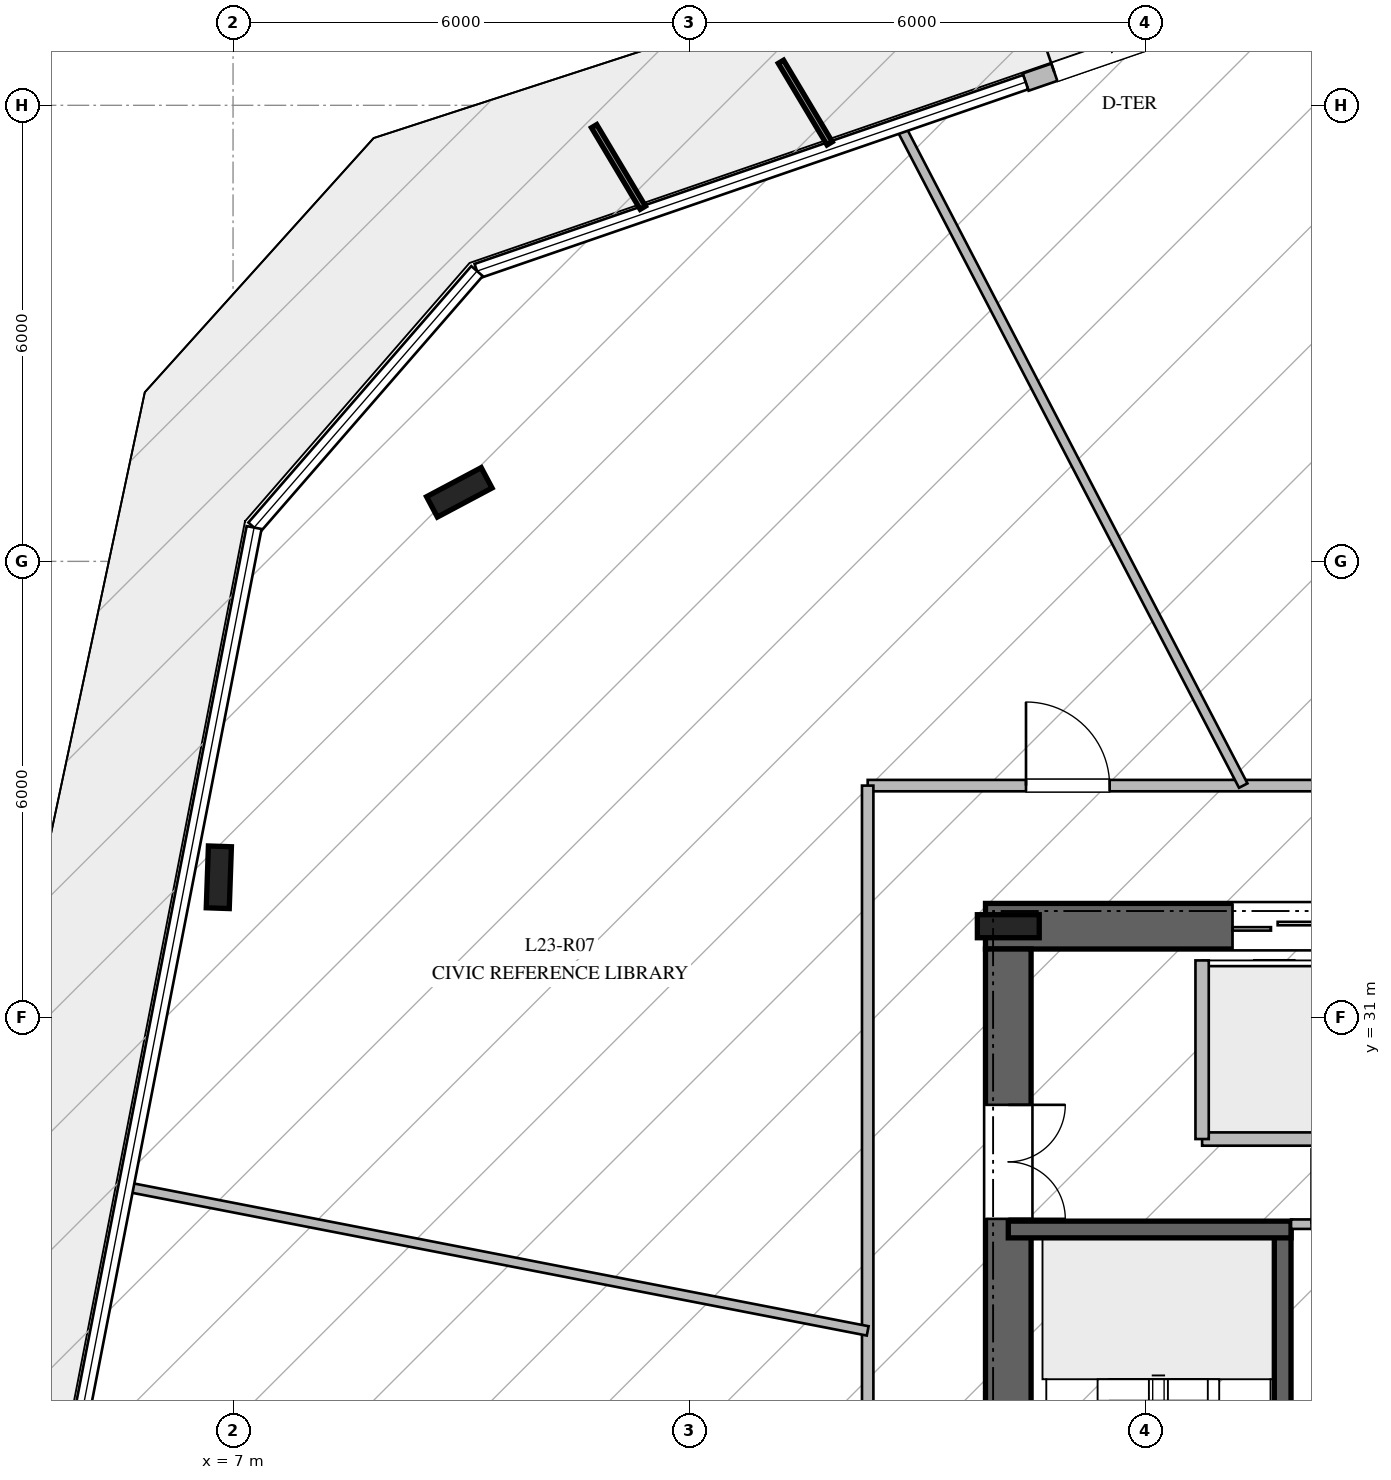
"""IFC4 building model, lengths in metres.
Left out: names, types, materials, properties, quantities, classifications, styles, units other than length and angle.
Written with IfcOpenShell. Run it as: python <this file> out.ifc"""

import sys

from ifc_helpers import new_model, si_unit, direction, frame, frame_2d, origin, origin_2d, place, context, subcontext, project, spatial, rectangle, i_section, extrude, element, fill, save


model = new_model("IFC4")
c1 = context("Model", 3, precision=1e-05, world=origin(), true_north=direction((0.0, 1.0)))
c2 = subcontext(c1, "Body", "Model", "MODEL_VIEW")
j1 = project(units=[si_unit("LENGTHUNIT", "METRE"), si_unit("PLANEANGLEUNIT", "RADIAN")], contexts=[c1])
p1 = place(None, origin())
s1 = spatial("IfcSite", under=j1, at=p1, CompositionType="ELEMENT")
p2 = place(p1, origin())
s2 = spatial("IfcBuilding", under=s1, at=p2, CompositionType="ELEMENT")
p3 = place(p2, frame((0.0, 0.0, 97.4)))
s3 = spatial("IfcBuildingStorey", under=s2, at=p3, CompositionType="ELEMENT", Elevation=97.4)
p4 = place(p3, frame((33.1, 32.2, 0.0), z_axis=(0.0, 0.0, 1.0), x_axis=(-1.0, 0.0, 0.0)))
e1 = element("IfcWall", 1, at=p4, inside=s3, PredefinedType="SHEAR", context=c2, shape_type="SweptSolid", body=[
    extrude(rectangle(XDim=16.2, YDim=0.6, at=frame_2d((8.1, 0.0))), origin(), (0.0, 0.0, 1.0), 4.76),
])
p5 = place(p4, frame((5.05, 0.0, 0.0)))
e2 = element("IfcOpeningElement", 2, at=p5, cuts=e1, PredefinedType="OPENING", context=c2, shape_type="SweptSolid", body=[
    extrude(rectangle(XDim=1.2, YDim=2.25, at=frame_2d((0.6, 1.125))), frame((0.0, 0.31, 0.0), z_axis=(0.0, -1.0, 0.0), x_axis=(1.0, 0.0, 0.0)), (0.0, 0.0, 1.0), 0.62),
])
p6 = place(p4, frame((11.85, 0.0, 0.0)))
e3 = element("IfcOpeningElement", 3, at=p6, cuts=e1, PredefinedType="OPENING", context=c2, shape_type="SweptSolid", body=[
    extrude(rectangle(XDim=1.1, YDim=2.2, at=frame_2d((0.55, 1.1))), frame((0.0, 0.31, 0.0), z_axis=(0.0, -1.0, 0.0), x_axis=(1.0, 0.0, 0.0)), (0.0, 0.0, 1.0), 0.62),
])
p7 = place(p4, frame((9.875, 0.0, 0.0)))
e4 = element("IfcOpeningElement", 4, at=p7, cuts=e1, PredefinedType="OPENING", context=c2, shape_type="SweptSolid", body=[
    extrude(rectangle(XDim=1.1, YDim=2.2, at=frame_2d((0.55, 1.1))), frame((0.0, 0.31, 0.0), z_axis=(0.0, -1.0, 0.0), x_axis=(1.0, 0.0, 0.0)), (0.0, 0.0, 1.0), 0.62),
])
p8 = place(p4, frame((7.9, 0.0, 0.0)))
e5 = element("IfcOpeningElement", 5, at=p8, cuts=e1, PredefinedType="OPENING", context=c2, shape_type="SweptSolid", body=[
    extrude(rectangle(XDim=1.1, YDim=2.2, at=frame_2d((0.55, 1.1))), frame((0.0, 0.31, 0.0), z_axis=(0.0, -1.0, 0.0), x_axis=(1.0, 0.0, 0.0)), (0.0, 0.0, 1.0), 0.62),
])
p9 = place(p3, frame((17.2, 31.9, 0.0), z_axis=(0.0, 0.0, 1.0), x_axis=(0.0, -1.0, 0.0)))
e6 = element("IfcWall", 6, at=p9, inside=s3, PredefinedType="SHEAR", context=c2, shape_type="SweptSolid", body=[
    extrude(rectangle(XDim=13.8, YDim=0.6, at=frame_2d((6.9, 0.0))), origin(), (0.0, 0.0, 1.0), 4.76),
])
p10 = place(p9, frame((2.05, 0.0, 0.0)))
e7 = element("IfcOpeningElement", 7, at=p10, cuts=e6, PredefinedType="OPENING", context=c2, shape_type="SweptSolid", body=[
    extrude(rectangle(XDim=1.5, YDim=2.2, at=frame_2d((0.75, 1.1))), frame((0.0, 0.31, 0.0), z_axis=(0.0, -1.0, 0.0), x_axis=(1.0, 0.0, 0.0)), (0.0, 0.0, 1.0), 0.62),
])
p11 = place(p3, frame((17.2, 32.2, 0.0), z_axis=(0.0, 0.0, 1.0), x_axis=(1.0, 0.0, 0.0)))
e8 = element("IfcColumn", 8, at=p11, inside=s3, PredefinedType="COLUMN", context=c2, shape_type="SweptSolid", body=[
    extrude(i_section(OverallWidth=0.303, OverallDepth=0.814, WebThickness=0.021, FlangeThickness=0.04, at=origin_2d()), origin(), (0.0, 0.0, 1.0), 5.0),
])
p12 = place(p3, frame((20.81, 20.99, 0.0), z_axis=(0.0, 0.0, 1.0), x_axis=(0.0, 1.0, 0.0)))
e9 = element("IfcWall", 9, at=p12, inside=s3, PredefinedType="SOLIDWALL", context=c2, shape_type="SweptSolid", body=[
    extrude(rectangle(XDim=7.22, YDim=0.22, at=frame_2d((3.61, 0.0))), origin(), (0.0, 0.0, 1.0), 4.76),
])
p13 = place(p12, frame((0.18, 0.0, 0.0)))
e10 = element("IfcOpeningElement", 10, at=p13, cuts=e9, PredefinedType="OPENING", context=c2, shape_type="SweptSolid", body=[
    extrude(rectangle(XDim=1.15, YDim=2.2, at=frame_2d((0.575, 1.1))), frame((0.0, 0.12, 0.0), z_axis=(0.0, -1.0, 0.0), x_axis=(1.0, 0.0, 0.0)), (0.0, 0.0, 1.0), 0.24),
])
p14 = place(p3, frame((17.2, 28.21, 0.0), z_axis=(0.0, 0.0, 1.0), x_axis=(1.0, 0.0, 0.0)))
e11 = element("IfcWall", 11, at=p14, inside=s3, PredefinedType="SOLIDWALL", context=c2, shape_type="SweptSolid", body=[
    extrude(rectangle(XDim=3.72, YDim=0.22, at=frame_2d((1.86, 0.0))), origin(), (0.0, 0.0, 1.0), 4.76),
])
for number, where, z_axis, x_axis in (
    (12, (9.977, 37.908, -0.27), (0.0, 0.0, 1.0), (0.883, 0.469, 0.0)),
    (13, (6.813, 32.844, -0.27), (0.0, 0.0, 1.0), (0.035, 0.999, 0.0)),
):
    element("IfcColumn", number, at=place(p3, frame(where, z_axis=z_axis, x_axis=x_axis)), inside=s3, PredefinedType="COLUMN", context=c2, shape_type="SweptSolid", body=[
        extrude(i_section(OverallWidth=0.303, OverallDepth=0.814, WebThickness=0.021, FlangeThickness=0.04, at=origin_2d()), origin(), (0.0, 0.0, 1.0), 5.27),
    ])
p15 = place(p3, frame((19.697, 44.086, 0.0), z_axis=(0.0, 0.0, 1.0), x_axis=(-0.945555551181, -0.325460749755, 0.0)))
e14 = element("IfcWall", 14, at=p15, inside=s3, PredefinedType="STANDARD", context=c2, shape_type="SweptSolid", body=[
    extrude(rectangle(XDim=2.4, YDim=0.24, at=frame_2d((1.2, 0.0))), origin(), (0.0, 0.0, 1.0), 4.76),
])
p16 = place(p15, frame((0.4, 0.0, 0.0)))
e15 = element("IfcOpeningElement", 15, at=p16, cuts=e14, PredefinedType="OPENING", context=c2, shape_type="SweptSolid", body=[
    extrude(rectangle(XDim=1.6, YDim=2.25, at=frame_2d((0.8, 1.125))), frame((0.0, 0.13, 0.0), z_axis=(0.0, -1.0, 0.0), x_axis=(1.0, 0.0, 0.0)), (0.0, 0.0, 1.0), 0.26),
])
p17 = place(p3, frame((20.92, 28.28, 0.0), z_axis=(0.0, 0.0, 1.0), x_axis=(1.0, 0.0, 0.0)))
e16 = element("IfcWall", 16, at=p17, inside=s3, PredefinedType="PARTITIONING", context=c2, shape_type="SweptSolid", body=[
    extrude(rectangle(XDim=3.405, YDim=0.125, at=frame_2d((1.703, 0.0))), origin(), (0.0, 0.0, 1.0), 4.76),
])
p18 = place(p17, frame((0.27, 0.0, 0.0)))
e17 = element("IfcOpeningElement", 17, at=p18, cuts=e16, PredefinedType="OPENING", context=c2, shape_type="SweptSolid", body=[
    extrude(rectangle(XDim=1.0, YDim=2.15, at=frame_2d((0.5, 1.075))), frame((0.0, 0.073, 0.0), z_axis=(0.0, -1.0, 0.0), x_axis=(1.0, 0.0, 0.0)), (0.0, 0.0, 1.0), 0.145),
])
p19 = place(p3, frame((19.75, 29.4, 0.0), z_axis=(0.0, 0.0, 1.0), x_axis=(1.0, 0.0, 0.0)))
e18 = element("IfcWall", 18, at=p19, inside=s3, PredefinedType="PARTITIONING", context=c2, shape_type="SweptSolid", body=[
    extrude(rectangle(XDim=1.9, YDim=0.175, at=frame_2d((0.95, 0.0))), origin(), (0.0, 0.0, 1.0), 4.76),
])
p20 = place(p3, frame((19.75, 29.4, 0.0), z_axis=(0.0, 0.0, 1.0), x_axis=(0.0, 1.0, 0.0)))
e19 = element("IfcWall", 19, at=p20, inside=s3, PredefinedType="PARTITIONING", context=c2, shape_type="SweptSolid", body=[
    extrude(rectangle(XDim=2.35, YDim=0.175, at=frame_2d((1.175, 0.0))), origin(), (0.0, 0.0, 1.0), 4.76),
])
p21 = place(p3, frame((15.35, 34.05, 0.0), z_axis=(0.0, 0.0, 1.0), x_axis=(1.0, 0.0, 0.0)))
e20 = element("IfcWall", 20, at=p21, inside=s3, PredefinedType="PARTITIONING", context=c2, shape_type="SweptSolid", body=[
    extrude(rectangle(XDim=19.3, YDim=0.15, at=frame_2d((9.65, 0.0))), origin(), (0.0, 0.0, 1.0), 4.21),
])
p22 = place(p21, frame((16.124, 0.0, 0.0)))
e21 = element("IfcOpeningElement", 21, at=p22, cuts=e20, PredefinedType="OPENING", context=c2, shape_type="SweptSolid", body=[
    extrude(rectangle(XDim=1.1, YDim=2.2, at=frame_2d((0.55, 1.1))), frame((0.0, 0.085, 0.0), z_axis=(0.0, -1.0, 0.0), x_axis=(1.0, 0.0, 0.0)), (0.0, 0.0, 1.0), 0.17),
])
p23 = place(p21, frame((9.194, 0.0, 0.0)))
e22 = element("IfcOpeningElement", 22, at=p23, cuts=e20, PredefinedType="OPENING", context=c2, shape_type="SweptSolid", body=[
    extrude(rectangle(XDim=1.1, YDim=2.2, at=frame_2d((0.55, 1.1))), frame((0.0, 0.085, 0.0), z_axis=(0.0, -1.0, 0.0), x_axis=(1.0, 0.0, 0.0)), (0.0, 0.0, 1.0), 0.17),
])
p24 = place(p21, frame((2.083, 0.0, 0.0)))
e23 = element("IfcOpeningElement", 23, at=p24, cuts=e20, PredefinedType="OPENING", context=c2, shape_type="SweptSolid", body=[
    extrude(rectangle(XDim=1.1, YDim=2.2, at=frame_2d((0.55, 1.1))), frame((0.0, 0.085, 0.0), z_axis=(0.0, -1.0, 0.0), x_axis=(1.0, 0.0, 0.0)), (0.0, 0.0, 1.0), 0.17),
])
p25 = place(p3, frame((15.35, 15.95, 0.0), z_axis=(0.0, 0.0, 1.0), x_axis=(0.0, 1.0, 0.0)))
e24 = element("IfcWall", 24, at=p25, inside=s3, PredefinedType="PARTITIONING", context=c2, shape_type="SweptSolid", body=[
    extrude(rectangle(XDim=18.1, YDim=0.15, at=frame_2d((9.05, 0.0))), origin(), (0.0, 0.0, 1.0), 4.21),
])
p26 = place(p25, frame((5.012, 0.0, 0.0)))
e25 = element("IfcOpeningElement", 25, at=p26, cuts=e24, PredefinedType="OPENING", context=c2, shape_type="SweptSolid", body=[
    extrude(rectangle(XDim=1.1, YDim=2.2, at=frame_2d((0.55, 1.1))), frame((0.0, 0.085, 0.0), z_axis=(0.0, -1.0, 0.0), x_axis=(1.0, 0.0, 0.0)), (0.0, 0.0, 1.0), 0.17),
])
p27 = place(p3, frame((20.291, 34.05, 0.0), z_axis=(0.0, 0.0, 1.0), x_axis=(-0.461526576331, 0.887126382958, 0.0)))
e26 = element("IfcWall", 26, at=p27, inside=s3, PredefinedType="PARTITIONING", context=c2, shape_type="SweptSolid", body=[
    extrude(rectangle(XDim=9.772, YDim=0.125, at=frame_2d((4.886, 0.0))), origin(), (0.0, 0.0, 1.0), 4.05),
])
p28 = place(p3, frame((15.35, 26.876, 0.0), z_axis=(0.0, 0.0, 1.0), x_axis=(-0.981638939677, 0.190748504868, 0.0)))
e27 = element("IfcWall", 27, at=p28, inside=s3, PredefinedType="PARTITIONING", context=c2, shape_type="SweptSolid", body=[
    extrude(rectangle(XDim=9.924, YDim=0.125, at=frame_2d((4.962, 0.0))), origin(), (0.0, 0.0, 1.0), 4.16),
])
p29 = place(p16, frame((1.6, 0.0, 0.0), z_axis=(0.0, 0.0, 1.0), x_axis=(-1.0, 0.0, 0.0)))
e28 = element("IfcDoor", 28, at=p29, inside=s3, OperationType="DOUBLE_DOOR_SINGLE_SWING", PredefinedType="DOOR", context=c2, shape_type="SweptSolid", body=[
    extrude(rectangle(XDim=1.6, YDim=2.25, at=frame_2d((0.8, 1.125))), frame((0.0, 0.025, 0.0), z_axis=(0.0, -1.0, 0.0), x_axis=(1.0, 0.0, 0.0)), (0.0, 0.0, 1.0), 0.05),
])
fill(e15, e28)
p30 = place(p10, origin())
e29 = element("IfcDoor", 29, at=p30, inside=s3, OperationType="DOUBLE_DOOR_SINGLE_SWING", PredefinedType="DOOR", context=c2, shape_type="SweptSolid", body=[
    extrude(rectangle(XDim=1.5, YDim=2.2, at=frame_2d((0.75, 1.1))), frame((0.0, 0.025, 0.0), z_axis=(0.0, -1.0, 0.0), x_axis=(1.0, 0.0, 0.0)), (0.0, 0.0, 1.0), 0.05),
])
fill(e7, e29)
p31 = place(p6, origin())
e30 = element("IfcDoor", 30, at=p31, inside=s3, OperationType="DOUBLE_DOOR_SLIDING", PredefinedType="DOOR", context=c2, shape_type="SweptSolid", body=[
    extrude(rectangle(XDim=1.1, YDim=2.2, at=frame_2d((0.55, 1.1))), frame((0.0, 0.025, 0.0), z_axis=(0.0, -1.0, 0.0), x_axis=(1.0, 0.0, 0.0)), (0.0, 0.0, 1.0), 0.05),
])
fill(e3, e30)
p32 = place(p24, origin())
e31 = element("IfcDoor", 31, at=p32, inside=s3, OperationType="SINGLE_SWING_LEFT", PredefinedType="DOOR", context=c2, shape_type="SweptSolid", body=[
    extrude(rectangle(XDim=1.1, YDim=2.2, at=frame_2d((0.55, 1.1))), frame((0.0, 0.025, 0.0), z_axis=(0.0, -1.0, 0.0), x_axis=(1.0, 0.0, 0.0)), (0.0, 0.0, 1.0), 0.05),
])
fill(e23, e31)
save(model, sys.argv[1])
